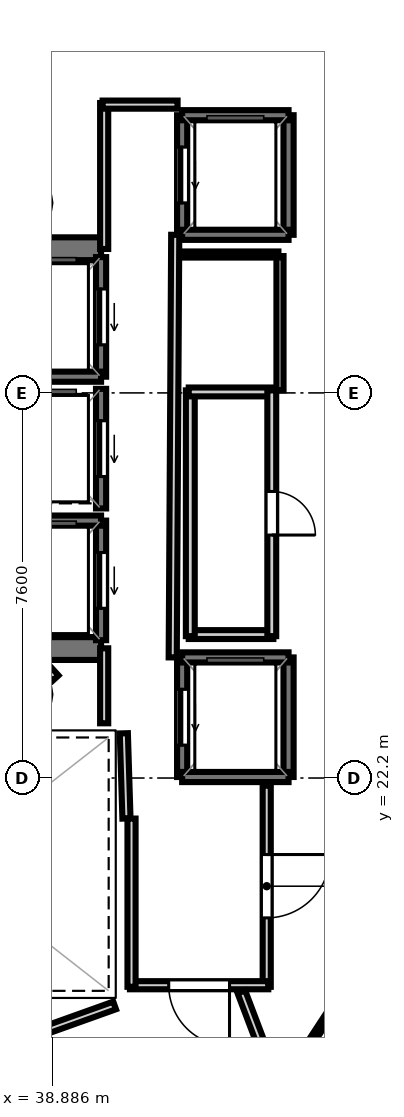
"""IFC4 building model, lengths in metres.
Left out: names, types, materials, properties, quantities, classifications, styles, units other than length and angle.
Written with IfcOpenShell. Run it as: python <this file> out.ifc"""

import sys

from ifc_helpers import new_model, si_unit, direction, frame, frame_2d, origin, place, context, subcontext, project, spatial, rectangle, extrude, element, fill, save


model = new_model("IFC4")
c1 = context("Model", 3, precision=1e-05, world=origin(), true_north=direction((0.0, 1.0)))
c2 = subcontext(c1, "Body", "Model", "MODEL_VIEW")
j1 = project(units=[si_unit("LENGTHUNIT", "METRE"), si_unit("PLANEANGLEUNIT", "RADIAN")], contexts=[c1])
p1 = place(None, origin())
s1 = spatial("IfcSite", under=j1, at=p1, CompositionType="ELEMENT")
p2 = place(p1, origin())
s2 = spatial("IfcBuilding", under=s1, at=p2, CompositionType="ELEMENT")
p3 = place(p2, frame((0.0, 0.0, 291.7)))
s3 = spatial("IfcBuildingStorey", under=s2, at=p3, CompositionType="ELEMENT", Elevation=291.7)
p4 = place(p3, frame((29.33, 32.645, 0.0), z_axis=(0.0, 0.0, 1.0), x_axis=(1.0, 0.0, 0.0)))
e1 = element("IfcWall", 1, at=p4, inside=s3, PredefinedType="SHEAR", context=c2, shape_type="SweptSolid", body=[
    extrude(rectangle(XDim=10.52, YDim=0.45, at=frame_2d((5.26, 0.0))), origin(), (0.0, 0.0, 1.0), 3.52),
])
p5 = place(p4, frame((0.895, 0.0, 0.0)))
e2 = element("IfcOpeningElement", 2, at=p5, cuts=e1, PredefinedType="OPENING", context=c2, shape_type="SweptSolid", body=[
    extrude(rectangle(XDim=1.25, YDim=2.15, at=frame_2d((0.625, 1.075))), frame((0.0, 0.235, 0.0), z_axis=(0.0, -1.0, 0.0), x_axis=(1.0, 0.0, 0.0)), (0.0, 0.0, 1.0), 0.47),
])
p6 = place(p3, frame((29.33, 24.755, 0.0), z_axis=(0.0, 0.0, 1.0), x_axis=(1.0, 0.0, 0.0)))
e3 = element("IfcWall", 3, at=p6, inside=s3, PredefinedType="SHEAR", context=c2, shape_type="SweptSolid", body=[
    extrude(rectangle(XDim=10.52, YDim=0.45, at=frame_2d((5.26, 0.0))), origin(), (0.0, 0.0, 1.0), 3.52),
])
p7 = place(p6, frame((0.695, 0.0, 0.0)))
e4 = element("IfcOpeningElement", 4, at=p7, cuts=e3, PredefinedType="OPENING", context=c2, shape_type="SweptSolid", body=[
    extrude(rectangle(XDim=1.25, YDim=2.15, at=frame_2d((0.625, 1.075))), frame((0.0, 0.235, 0.0), z_axis=(0.0, -1.0, 0.0), x_axis=(1.0, 0.0, 0.0)), (0.0, 0.0, 1.0), 0.47),
])
p8 = place(p3, frame((39.85, 30.12, 0.0), z_axis=(0.0, 0.0, 1.0), x_axis=(0.0, 1.0, 0.0)))
e5 = element("IfcWall", 5, at=p8, inside=s3, PredefinedType="SOLIDWALL", context=c2, shape_type="SweptSolid", body=[
    extrude(rectangle(XDim=2.36, YDim=0.2, at=frame_2d((1.18, 0.0))), origin(), (0.0, 0.0, 1.0), 3.52),
])
p9 = place(p8, frame((0.63, 0.0, 0.0)))
e6 = element("IfcOpeningElement", 6, at=p9, cuts=e5, PredefinedType="OPENING", context=c2, shape_type="SweptSolid", body=[
    extrude(rectangle(XDim=1.1, YDim=2.15, at=frame_2d((0.55, 1.075))), frame((0.0, 0.11, 0.0), z_axis=(0.0, -1.0, 0.0), x_axis=(1.0, 0.0, 0.0)), (0.0, 0.0, 1.0), 0.22),
])
p10 = place(p3, frame((37.75, 30.12, 0.0), z_axis=(0.0, 0.0, 1.0), x_axis=(1.0, 0.0, 0.0)))
e7 = element("IfcWall", 7, at=p10, inside=s3, PredefinedType="SOLIDWALL", context=c2, shape_type="SweptSolid", body=[
    extrude(rectangle(XDim=2.1, YDim=0.2, at=frame_2d((1.05, 0.0))), origin(), (0.0, 0.0, 1.0), 3.52),
])
p11 = place(p3, frame((39.85, 24.92, 0.0), z_axis=(0.0, 0.0, 1.0), x_axis=(0.0, 1.0, 0.0)))
e8 = element("IfcWall", 8, at=p11, inside=s3, PredefinedType="SOLIDWALL", context=c2, shape_type="SweptSolid", body=[
    extrude(rectangle(XDim=2.36, YDim=0.2, at=frame_2d((1.18, 0.0))), origin(), (0.0, 0.0, 1.0), 3.52),
])
p12 = place(p11, frame((0.63, 0.0, 0.0)))
e9 = element("IfcOpeningElement", 9, at=p12, cuts=e8, PredefinedType="OPENING", context=c2, shape_type="SweptSolid", body=[
    extrude(rectangle(XDim=1.1, YDim=2.15, at=frame_2d((0.55, 1.075))), frame((0.0, 0.11, 0.0), z_axis=(0.0, -1.0, 0.0), x_axis=(1.0, 0.0, 0.0)), (0.0, 0.0, 1.0), 0.22),
])
p13 = place(p3, frame((37.75, 27.28, 0.0), z_axis=(0.0, 0.0, 1.0), x_axis=(1.0, 0.0, 0.0)))
e10 = element("IfcWall", 10, at=p13, inside=s3, PredefinedType="SOLIDWALL", context=c2, shape_type="SweptSolid", body=[
    extrude(rectangle(XDim=2.1, YDim=0.2, at=frame_2d((1.05, 0.0))), origin(), (0.0, 0.0, 1.0), 3.52),
])
p14 = place(p3, frame((39.85, 27.52, 0.0), z_axis=(0.0, 0.0, 1.0), x_axis=(0.0, 1.0, 0.0)))
e11 = element("IfcWall", 11, at=p14, inside=s3, PredefinedType="SOLIDWALL", context=c2, shape_type="SweptSolid", body=[
    extrude(rectangle(XDim=2.36, YDim=0.2, at=frame_2d((1.18, 0.0))), origin(), (0.0, 0.0, 1.0), 3.52),
])
p15 = place(p14, frame((0.63, 0.0, 0.0)))
e12 = element("IfcOpeningElement", 12, at=p15, cuts=e11, PredefinedType="OPENING", context=c2, shape_type="SweptSolid", body=[
    extrude(rectangle(XDim=1.1, YDim=2.15, at=frame_2d((0.55, 1.075))), frame((0.0, 0.11, 0.0), z_axis=(0.0, -1.0, 0.0), x_axis=(1.0, 0.0, 0.0)), (0.0, 0.0, 1.0), 0.22),
])
p16 = place(p3, frame((43.55, 22.22, 0.0), z_axis=(0.0, 0.0, 1.0), x_axis=(0.0, 1.0, 0.0)))
e13 = element("IfcWall", 13, at=p16, inside=s3, PredefinedType="SOLIDWALL", context=c2, shape_type="SweptSolid", body=[
    extrude(rectangle(XDim=2.36, YDim=0.2, at=frame_2d((1.18, 0.0))), origin(), (0.0, 0.0, 1.0), 3.52),
])
p17 = place(p3, frame((41.45, 22.22, 0.0), z_axis=(0.0, 0.0, 1.0), x_axis=(0.0, 1.0, 0.0)))
e14 = element("IfcWall", 14, at=p17, inside=s3, PredefinedType="SOLIDWALL", context=c2, shape_type="SweptSolid", body=[
    extrude(rectangle(XDim=2.36, YDim=0.2, at=frame_2d((1.18, 0.0))), origin(), (0.0, 0.0, 1.0), 3.52),
])
p18 = place(p17, frame((0.63, 0.0, 0.0)))
e15 = element("IfcOpeningElement", 15, at=p18, cuts=e14, PredefinedType="OPENING", context=c2, shape_type="SweptSolid", body=[
    extrude(rectangle(XDim=1.1, YDim=2.15, at=frame_2d((0.55, 1.075))), frame((0.0, 0.11, 0.0), z_axis=(0.0, -1.0, 0.0), x_axis=(1.0, 0.0, 0.0)), (0.0, 0.0, 1.0), 0.22),
])
for number, where, z_axis, x_axis in (
    (16, (41.45, 24.58, 0.0), (0.0, 0.0, 1.0), (1.0, 0.0, 0.0)),
    (17, (41.45, 22.22, 0.0), (0.0, 0.0, 1.0), (1.0, 0.0, 0.0)),
):
    element("IfcWall", number, at=place(p3, frame(where, z_axis=z_axis, x_axis=x_axis)), inside=s3, PredefinedType="SOLIDWALL", context=c2, shape_type="SweptSolid", body=[
        extrude(rectangle(XDim=2.1, YDim=0.2, at=frame_2d((1.05, 0.0))), origin(), (0.0, 0.0, 1.0), 3.52),
    ])
p19 = place(p3, frame((43.55, 32.92, 0.0), z_axis=(0.0, 0.0, 1.0), x_axis=(0.0, 1.0, 0.0)))
e18 = element("IfcWall", 18, at=p19, inside=s3, PredefinedType="SOLIDWALL", context=c2, shape_type="SweptSolid", body=[
    extrude(rectangle(XDim=2.36, YDim=0.2, at=frame_2d((1.18, 0.0))), origin(), (0.0, 0.0, 1.0), 3.52),
])
p20 = place(p3, frame((41.45, 32.92, 0.0), z_axis=(0.0, 0.0, 1.0), x_axis=(0.0, 1.0, 0.0)))
e19 = element("IfcWall", 19, at=p20, inside=s3, PredefinedType="SOLIDWALL", context=c2, shape_type="SweptSolid", body=[
    extrude(rectangle(XDim=2.36, YDim=0.2, at=frame_2d((1.18, 0.0))), origin(), (0.0, 0.0, 1.0), 3.52),
])
p21 = place(p20, frame((0.63, 0.0, 0.0)))
e20 = element("IfcOpeningElement", 20, at=p21, cuts=e19, PredefinedType="OPENING", context=c2, shape_type="SweptSolid", body=[
    extrude(rectangle(XDim=1.1, YDim=2.15, at=frame_2d((0.55, 1.075))), frame((0.0, 0.11, 0.0), z_axis=(0.0, -1.0, 0.0), x_axis=(1.0, 0.0, 0.0)), (0.0, 0.0, 1.0), 0.22),
])
for number, where, z_axis, x_axis in (
    (21, (41.45, 35.28, 0.0), (0.0, 0.0, 1.0), (1.0, 0.0, 0.0)),
    (22, (41.45, 32.92, 0.0), (0.0, 0.0, 1.0), (1.0, 0.0, 0.0)),
):
    element("IfcWall", number, at=place(p3, frame(where, z_axis=z_axis, x_axis=x_axis)), inside=s3, PredefinedType="SOLIDWALL", context=c2, shape_type="SweptSolid", body=[
        extrude(rectangle(XDim=2.1, YDim=0.2, at=frame_2d((1.05, 0.0))), origin(), (0.0, 0.0, 1.0), 3.52),
    ])
p22 = place(p3, frame((40.351, 21.401, 0.0), z_axis=(0.0, 0.0, 1.0), x_axis=(-0.031058045979, 0.999517582527, 0.0)))
e23 = element("IfcWall", 23, at=p22, inside=s3, PredefinedType="PARTITIONING", context=c2, shape_type="SweptSolid", body=[
    extrude(rectangle(XDim=1.682, YDim=0.16, at=frame_2d((0.841, 0.0))), origin(), (0.0, 0.0, 1.0), 2.84),
])
p23 = place(p3, frame((39.911, 23.28, 0.0), z_axis=(0.0, 0.0, 1.0), x_axis=(0.0, 1.0, 0.0)))
e24 = element("IfcWall", 24, at=p23, inside=s3, PredefinedType="PARTITIONING", context=c2, shape_type="SweptSolid", body=[
    extrude(rectangle(XDim=1.48, YDim=0.16, at=frame_2d((0.74, 0.0))), origin(), (0.0, 0.0, 1.0), 2.84),
])
p24 = place(p3, frame((39.911, 32.64, 0.0), z_axis=(0.0, 0.0, 1.0), x_axis=(0.0, 1.0, 0.0)))
e25 = element("IfcWall", 25, at=p24, inside=s3, PredefinedType="PARTITIONING", context=c2, shape_type="SweptSolid", body=[
    extrude(rectangle(XDim=2.88, YDim=0.16, at=frame_2d((1.44, 0.0))), origin(), (0.0, 0.0, 1.0), 2.84),
])
p25 = place(p3, frame((39.88, 35.489, 0.0), z_axis=(0.0, 0.0, 1.0), x_axis=(1.0, 0.0, 0.0)))
e26 = element("IfcWall", 26, at=p25, inside=s3, PredefinedType="PARTITIONING", context=c2, shape_type="SweptSolid", body=[
    extrude(rectangle(XDim=1.48, YDim=0.16, at=frame_2d((0.74, 0.0))), origin(), (0.0, 0.0, 1.0), 2.84),
])
p26 = place(p3, frame((41.313, 32.92, 0.0), z_axis=(0.0, 0.0, 1.0), x_axis=(-0.005942518022, -0.999982343084, 0.0)))
e27 = element("IfcWall", 27, at=p26, inside=s3, PredefinedType="PARTITIONING", context=c2, shape_type="SweptSolid", body=[
    extrude(rectangle(XDim=8.34, YDim=0.16, at=frame_2d((4.17, 0.0))), origin(), (0.0, 0.0, 1.0), 2.84),
])
p27 = place(p3, frame((43.119, 22.05, 0.0), z_axis=(0.0, 0.0, 1.0), x_axis=(0.0, -1.0, 0.0)))
e28 = element("IfcWall", 28, at=p27, inside=s3, PredefinedType="PARTITIONING", context=c2, shape_type="SweptSolid", body=[
    extrude(rectangle(XDim=3.97, YDim=0.16, at=frame_2d((1.985, 0.0))), origin(), (0.0, 0.0, 1.0), 2.84),
])
p28 = place(p27, frame((1.36, 0.0, 0.0)))
e29 = element("IfcOpeningElement", 29, at=p28, cuts=e28, PredefinedType="OPENING", context=c2, shape_type="SweptSolid", body=[
    extrude(rectangle(XDim=1.25, YDim=2.2, at=frame_2d((0.625, 1.1))), frame((0.0, 0.09, 0.0), z_axis=(0.0, -1.0, 0.0), x_axis=(1.0, 0.0, 0.0)), (0.0, 0.0, 1.0), 0.18),
])
p29 = place(p3, frame((43.15, 18.111, 0.0), z_axis=(0.0, 0.0, 1.0), x_axis=(-1.0, 0.0, 0.0)))
e30 = element("IfcWall", 30, at=p29, inside=s3, PredefinedType="PARTITIONING", context=c2, shape_type="SweptSolid", body=[
    extrude(rectangle(XDim=2.73, YDim=0.16, at=frame_2d((1.365, 0.0))), origin(), (0.0, 0.0, 1.0), 2.84),
])
p30 = place(p29, frame((0.765, 0.0, 0.0)))
e31 = element("IfcOpeningElement", 31, at=p30, cuts=e30, PredefinedType="OPENING", context=c2, shape_type="SweptSolid", body=[
    extrude(rectangle(XDim=1.2, YDim=2.15, at=frame_2d((0.6, 1.075))), frame((0.0, 0.09, 0.0), z_axis=(0.0, -1.0, 0.0), x_axis=(1.0, 0.0, 0.0)), (0.0, 0.0, 1.0), 0.18),
])
p31 = place(p3, frame((40.451, 18.08, 0.0), z_axis=(0.0, 0.0, 1.0), x_axis=(0.0, 1.0, 0.0)))
e32 = element("IfcWall", 32, at=p31, inside=s3, PredefinedType="PARTITIONING", context=c2, shape_type="SweptSolid", body=[
    extrude(rectangle(XDim=3.32, YDim=0.16, at=frame_2d((1.66, 0.0))), origin(), (0.0, 0.0, 1.0), 2.84),
])
p32 = place(p3, frame((43.25, 25.031, 0.0), z_axis=(0.0, 0.0, 1.0), x_axis=(-1.0, 0.0, 0.0)))
e33 = element("IfcWall", 33, at=p32, inside=s3, PredefinedType="PLUMBINGWALL", context=c2, shape_type="SweptSolid", body=[
    extrude(rectangle(XDim=1.67, YDim=0.175, at=frame_2d((0.835, 0.0))), origin(), (0.0, 0.0, 1.0), 2.84),
])
p33 = place(p3, frame((41.611, 25.0, 0.0), z_axis=(0.0, 0.0, 1.0), x_axis=(0.0, 1.0, 0.0)))
e34 = element("IfcWall", 34, at=p33, inside=s3, PredefinedType="PLUMBINGWALL", context=c2, shape_type="SweptSolid", body=[
    extrude(rectangle(XDim=4.85, YDim=0.175, at=frame_2d((2.425, 0.0))), origin(), (0.0, 0.0, 1.0), 2.84),
])
p34 = place(p3, frame((41.58, 29.819, 0.0), z_axis=(0.0, 0.0, 1.0), x_axis=(1.0, 0.0, 0.0)))
e35 = element("IfcWall", 35, at=p34, inside=s3, PredefinedType="PLUMBINGWALL", context=c2, shape_type="SweptSolid", body=[
    extrude(rectangle(XDim=1.67, YDim=0.175, at=frame_2d((0.835, 0.0))), origin(), (0.0, 0.0, 1.0), 2.84),
])
p35 = place(p3, frame((43.219, 29.85, 0.0), z_axis=(0.0, 0.0, 1.0), x_axis=(0.0, -1.0, 0.0)))
e36 = element("IfcWall", 36, at=p35, inside=s3, PredefinedType="PLUMBINGWALL", context=c2, shape_type="SweptSolid", body=[
    extrude(rectangle(XDim=4.85, YDim=0.175, at=frame_2d((2.425, 0.0))), origin(), (0.0, 0.0, 1.0), 2.84),
])
p36 = place(p35, frame((1.995, 0.0, 0.0)))
e37 = element("IfcOpeningElement", 37, at=p36, cuts=e36, PredefinedType="OPENING", context=c2, shape_type="SweptSolid", body=[
    extrude(rectangle(XDim=0.86, YDim=2.05, at=frame_2d((0.43, 1.025))), frame((0.0, 0.097, 0.0), z_axis=(0.0, -1.0, 0.0), x_axis=(1.0, 0.0, 0.0)), (0.0, 0.0, 1.0), 0.195),
])
p37 = place(p3, frame((38.951, 24.171, 0.0), z_axis=(0.0, 0.0, 1.0), x_axis=(-0.674186852077, 0.738560822469, 0.0)))
e38 = element("IfcWall", 38, at=p37, inside=s3, PredefinedType="PARTITIONING", context=c2, shape_type="SweptSolid", body=[
    extrude(rectangle(XDim=0.281, YDim=0.16, at=frame_2d((0.14, 0.0))), origin(), (0.0, 0.0, 1.0), 2.84),
])
p38 = place(p3, frame((36.81, 16.529, 0.0), z_axis=(0.0, 0.0, 1.0), x_axis=(0.941548344365, 0.33687789364, 0.0)))
e39 = element("IfcWall", 39, at=p38, inside=s3, PredefinedType="PARTITIONING", context=c2, shape_type="SweptSolid", body=[
    extrude(rectangle(XDim=3.513, YDim=0.16, at=frame_2d((1.756, 0.0))), origin(), (0.0, 0.0, 1.0), 2.84),
])
p39 = place(p3, frame((42.619, 17.98, 0.0), z_axis=(0.0, 0.0, 1.0), x_axis=(0.354310790583, -0.935127725862, 0.0)))
e40 = element("IfcWall", 40, at=p39, inside=s3, PredefinedType="PARTITIONING", context=c2, shape_type="SweptSolid", body=[
    extrude(rectangle(XDim=2.743, YDim=0.16, at=frame_2d((1.372, 0.0))), origin(), (0.0, 0.0, 1.0), 2.84),
])
p40 = place(p3, frame((43.381, 29.85, 0.0), z_axis=(0.0, 0.0, 1.0), x_axis=(0.0, 1.0, 0.0)))
e41 = element("IfcWall", 41, at=p40, inside=s3, PredefinedType="PARTITIONING", context=c2, shape_type="SweptSolid", body=[
    extrude(rectangle(XDim=2.65, YDim=0.14, at=frame_2d((1.325, 0.0))), origin(), (0.0, 0.0, 1.0), 2.84),
])
p41 = place(p3, frame((43.35, 32.531, 0.0), z_axis=(0.0, 0.0, 1.0), x_axis=(-1.0, 0.0, 0.0)))
e42 = element("IfcWall", 42, at=p41, inside=s3, PredefinedType="PARTITIONING", context=c2, shape_type="SweptSolid", body=[
    extrude(rectangle(XDim=1.91, YDim=0.12, at=frame_2d((0.955, 0.0))), origin(), (0.0, 0.0, 1.0), 2.84),
])
p42 = place(p3, frame((56.387, 35.955, 0.0), z_axis=(0.0, 0.0, 1.0), x_axis=(-0.547085490545, -0.837076738439, 0.0)))
e43 = element("IfcWall", 43, at=p42, inside=s3, PredefinedType="PARTITIONING", context=c2, shape_type="SweptSolid", body=[
    extrude(rectangle(XDim=34.443, YDim=0.12, at=frame_2d((17.221, 0.0))), origin(), (0.0, 0.0, 1.0), 2.84),
])
p43 = place(p9, origin())
e44 = element("IfcDoor", 44, at=p43, inside=s3, OperationType="SLIDING_TO_LEFT", PredefinedType="DOOR", context=c2, shape_type="SweptSolid", body=[
    extrude(rectangle(XDim=1.1, YDim=2.15, at=frame_2d((0.55, 1.075))), frame((0.0, 0.025, 0.0), z_axis=(0.0, -1.0, 0.0), x_axis=(1.0, 0.0, 0.0)), (0.0, 0.0, 1.0), 0.05),
])
fill(e6, e44)
p44 = place(p12, origin())
e45 = element("IfcDoor", 45, at=p44, inside=s3, OperationType="SLIDING_TO_LEFT", PredefinedType="DOOR", context=c2, shape_type="SweptSolid", body=[
    extrude(rectangle(XDim=1.1, YDim=2.15, at=frame_2d((0.55, 1.075))), frame((0.0, 0.025, 0.0), z_axis=(0.0, -1.0, 0.0), x_axis=(1.0, 0.0, 0.0)), (0.0, 0.0, 1.0), 0.05),
])
fill(e9, e45)
p45 = place(p15, origin())
e46 = element("IfcDoor", 46, at=p45, inside=s3, OperationType="SLIDING_TO_LEFT", PredefinedType="DOOR", context=c2, shape_type="SweptSolid", body=[
    extrude(rectangle(XDim=1.1, YDim=2.15, at=frame_2d((0.55, 1.075))), frame((0.0, 0.025, 0.0), z_axis=(0.0, -1.0, 0.0), x_axis=(1.0, 0.0, 0.0)), (0.0, 0.0, 1.0), 0.05),
])
fill(e12, e46)
p46 = place(p18, origin())
e47 = element("IfcDoor", 47, at=p46, inside=s3, OperationType="SLIDING_TO_LEFT", PredefinedType="DOOR", context=c2, shape_type="SweptSolid", body=[
    extrude(rectangle(XDim=1.1, YDim=2.15, at=frame_2d((0.55, 1.075))), frame((0.0, 0.025, 0.0), z_axis=(0.0, -1.0, 0.0), x_axis=(1.0, 0.0, 0.0)), (0.0, 0.0, 1.0), 0.05),
])
fill(e15, e47)
p47 = place(p21, origin())
e48 = element("IfcDoor", 48, at=p47, inside=s3, OperationType="SLIDING_TO_LEFT", PredefinedType="DOOR", context=c2, shape_type="SweptSolid", body=[
    extrude(rectangle(XDim=1.1, YDim=2.15, at=frame_2d((0.55, 1.075))), frame((0.0, 0.025, 0.0), z_axis=(0.0, -1.0, 0.0), x_axis=(1.0, 0.0, 0.0)), (0.0, 0.0, 1.0), 0.05),
])
fill(e20, e48)
p48 = place(p30, origin())
e49 = element("IfcDoor", 49, at=p48, inside=s3, OperationType="SINGLE_SWING_LEFT", PredefinedType="DOOR", context=c2, shape_type="SweptSolid", body=[
    extrude(rectangle(XDim=1.2, YDim=2.15, at=frame_2d((0.6, 1.075))), frame((0.0, 0.025, 0.0), z_axis=(0.0, -1.0, 0.0), x_axis=(1.0, 0.0, 0.0)), (0.0, 0.0, 1.0), 0.05),
])
fill(e31, e49)
p49 = place(p28, origin())
e50 = element("IfcDoor", 50, at=p49, inside=s3, OperationType="SINGLE_SWING_LEFT", PredefinedType="DOOR", context=c2, shape_type="SweptSolid", body=[
    extrude(rectangle(XDim=1.25, YDim=2.2, at=frame_2d((0.625, 1.1))), frame((0.0, 0.025, 0.0), z_axis=(0.0, -1.0, 0.0), x_axis=(1.0, 0.0, 0.0)), (0.0, 0.0, 1.0), 0.05),
])
fill(e29, e50)
p50 = place(p36, origin())
e51 = element("IfcDoor", 51, at=p50, inside=s3, OperationType="SINGLE_SWING_RIGHT", PredefinedType="DOOR", context=c2, shape_type="SweptSolid", body=[
    extrude(rectangle(XDim=0.86, YDim=2.05, at=frame_2d((0.43, 1.025))), frame((0.0, 0.025, 0.0), z_axis=(0.0, -1.0, 0.0), x_axis=(1.0, 0.0, 0.0)), (0.0, 0.0, 1.0), 0.05),
])
fill(e37, e51)
save(model, sys.argv[1])
